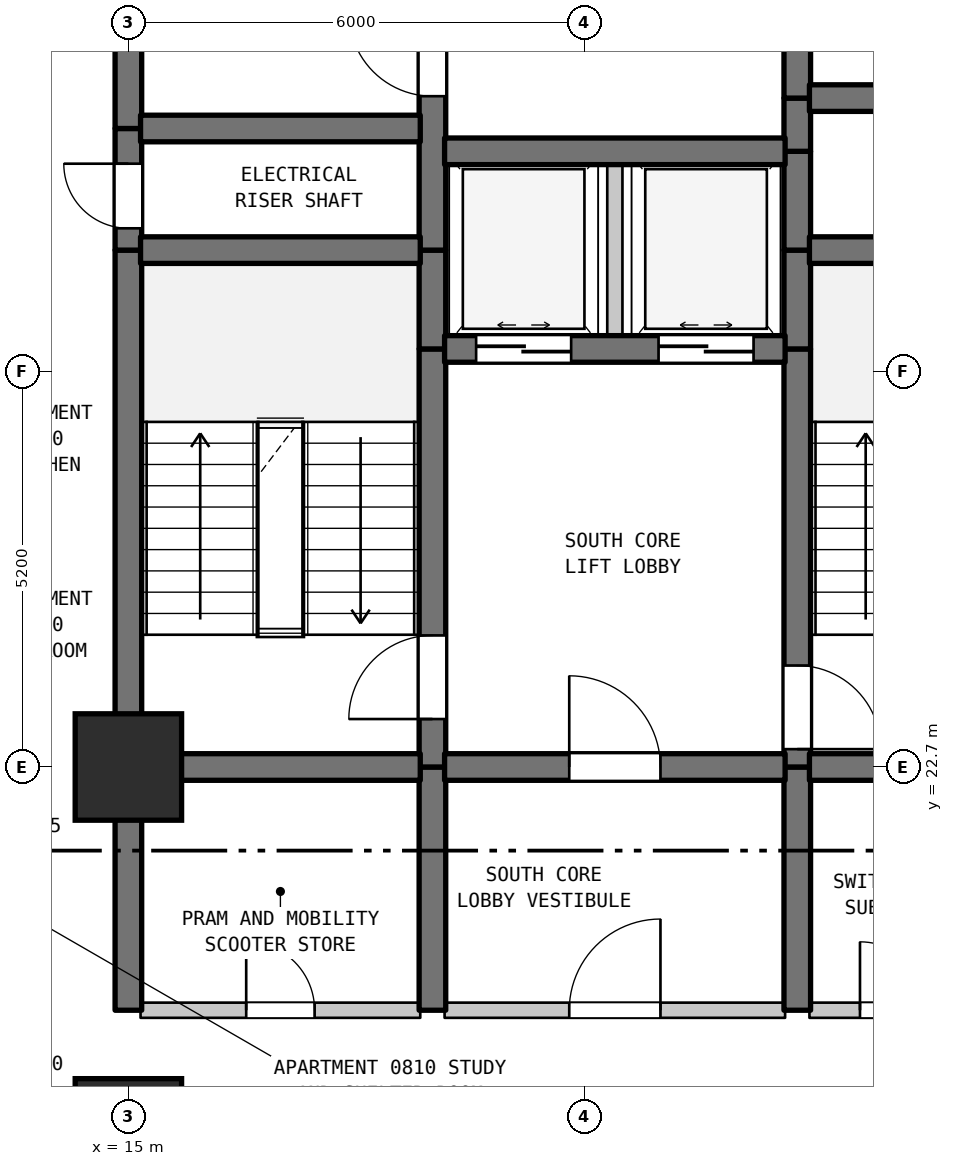
"""IFC4 building model, lengths in metres.
Left out: names, types, materials, properties, quantities, classifications, styles, units other than length and angle.
Written with IfcOpenShell. Run it as: python <this file> out.ifc"""

import sys

from ifc_helpers import new_model, si_unit, direction, frame, frame_2d, origin, origin_2d, place, context, subcontext, project, spatial, rectangle, extrude, element, fill, save


model = new_model("IFC4")
c1 = context("Model", 3, precision=1e-05, world=origin(), true_north=direction((0.0, 1.0)))
c2 = subcontext(c1, "Body", "Model", "MODEL_VIEW")
j1 = project(units=[si_unit("LENGTHUNIT", "METRE"), si_unit("PLANEANGLEUNIT", "RADIAN")], contexts=[c1])
p1 = place(None, origin())
s1 = spatial("IfcSite", under=j1, at=p1, CompositionType="ELEMENT")
p2 = place(p1, origin())
s2 = spatial("IfcBuilding", under=s1, at=p2, CompositionType="ELEMENT")
p3 = place(p2, frame((0.0, 0.0, 38.8)))
s3 = spatial("IfcBuildingStorey", under=s2, at=p3, CompositionType="ELEMENT", Elevation=38.8)
for number, where, z_axis, x_axis in (
    (1, (15.0, 17.9, 0.0), (0.0, 0.0, 1.0), (1.0, 0.0, 0.0)),
    (2, (15.0, 22.7, 0.0), (0.0, 0.0, 1.0), (1.0, 0.0, 0.0)),
):
    element("IfcColumn", number, at=place(p3, frame(where, z_axis=z_axis, x_axis=x_axis)), inside=s3, PredefinedType="COLUMN", context=c2, shape_type="SweptSolid", body=[
        extrude(rectangle(XDim=1.4, YDim=1.4, at=origin_2d()), origin(), (0.0, 0.0, 1.0), 3.7),
    ])
p4 = place(p3, frame((15.0, 19.5, 0.0), z_axis=(0.0, 0.0, 1.0), x_axis=(0.0, 1.0, 0.0)))
e3 = element("IfcWall", 3, at=p4, inside=s3, PredefinedType="SHEAR", context=c2, shape_type="SweptSolid", body=[
    extrude(rectangle(XDim=3.2, YDim=0.35, at=frame_2d((1.6, 0.0))), origin(), (0.0, 0.0, 1.0), 3.385),
])
p5 = place(p3, frame((15.0, 22.7, 0.0), z_axis=(0.0, 0.0, 1.0), x_axis=(0.0, 1.0, 0.0)))
e4 = element("IfcWall", 4, at=p5, inside=s3, PredefinedType="SHEAR", context=c2, shape_type="SweptSolid", body=[
    extrude(rectangle(XDim=6.8, YDim=0.35, at=frame_2d((3.4, 0.0))), origin(), (0.0, 0.0, 1.0), 3.385),
])
p6 = place(p3, frame((15.0, 29.5, 0.0), z_axis=(0.0, 0.0, 1.0), x_axis=(0.0, 1.0, 0.0)))
e5 = element("IfcWall", 5, at=p6, inside=s3, PredefinedType="SHEAR", context=c2, shape_type="SweptSolid", body=[
    extrude(rectangle(XDim=1.6, YDim=0.35, at=frame_2d((0.8, 0.0))), origin(), (0.0, 0.0, 1.0), 3.385),
])
p7 = place(p6, frame((0.287, 0.0, 0.0)))
e6 = element("IfcOpeningElement", 6, at=p7, cuts=e5, PredefinedType="OPENING", context=c2, shape_type="SweptSolid", body=[
    extrude(rectangle(XDim=0.85, YDim=2.1, at=frame_2d((0.425, 1.05))), frame((0.0, 0.185, 0.0), z_axis=(0.0, -1.0, 0.0), x_axis=(1.0, 0.0, 0.0)), (0.0, 0.0, 1.0), 0.37),
])
p8 = place(p3, frame((15.0, 31.1, 0.0), z_axis=(0.0, 0.0, 1.0), x_axis=(0.0, 1.0, 0.0)))
e7 = element("IfcWall", 7, at=p8, inside=s3, PredefinedType="SHEAR", context=c2, shape_type="SweptSolid", body=[
    extrude(rectangle(XDim=6.8, YDim=0.35, at=frame_2d((3.4, 0.0))), origin(), (0.0, 0.0, 1.0), 3.385),
])
p9 = place(p3, frame((19.0, 19.5, 0.0), z_axis=(0.0, 0.0, 1.0), x_axis=(0.0, 1.0, 0.0)))
e8 = element("IfcWall", 8, at=p9, inside=s3, PredefinedType="SHEAR", context=c2, shape_type="SweptSolid", body=[
    extrude(rectangle(XDim=3.2, YDim=0.35, at=frame_2d((1.6, 0.0))), origin(), (0.0, 0.0, 1.0), 3.385),
])
p10 = place(p3, frame((19.0, 22.7, 0.0), z_axis=(0.0, 0.0, 1.0), x_axis=(0.0, 1.0, 0.0)))
e9 = element("IfcWall", 9, at=p10, inside=s3, PredefinedType="SHEAR", context=c2, shape_type="SweptSolid", body=[
    extrude(rectangle(XDim=5.5, YDim=0.35, at=frame_2d((2.75, 0.0))), origin(), (0.0, 0.0, 1.0), 3.385),
])
p11 = place(p10, frame((0.631, 0.0, 0.0)))
e10 = element("IfcOpeningElement", 10, at=p11, cuts=e9, PredefinedType="OPENING", context=c2, shape_type="SweptSolid", body=[
    extrude(rectangle(XDim=1.1, YDim=2.15, at=frame_2d((0.55, 1.075))), frame((0.0, 0.185, 0.0), z_axis=(0.0, -1.0, 0.0), x_axis=(1.0, 0.0, 0.0)), (0.0, 0.0, 1.0), 0.37),
])
p12 = place(p3, frame((19.0, 28.2, 0.0), z_axis=(0.0, 0.0, 1.0), x_axis=(0.0, 1.0, 0.0)))
e11 = element("IfcWall", 11, at=p12, inside=s3, PredefinedType="SHEAR", context=c2, shape_type="SweptSolid", body=[
    extrude(rectangle(XDim=1.3, YDim=0.35, at=frame_2d((0.65, 0.0))), origin(), (0.0, 0.0, 1.0), 3.385),
])
p13 = place(p3, frame((19.0, 29.5, 0.0), z_axis=(0.0, 0.0, 1.0), x_axis=(0.0, 1.0, 0.0)))
e12 = element("IfcWall", 12, at=p13, inside=s3, PredefinedType="SHEAR", context=c2, shape_type="SweptSolid", body=[
    extrude(rectangle(XDim=5.5, YDim=0.35, at=frame_2d((2.75, 0.0))), origin(), (0.0, 0.0, 1.0), 3.385),
])
p14 = place(p13, frame((2.025, 0.0, 0.0)))
e13 = element("IfcOpeningElement", 13, at=p14, cuts=e12, PredefinedType="OPENING", context=c2, shape_type="SweptSolid", body=[
    extrude(rectangle(XDim=1.1, YDim=2.15, at=frame_2d((0.55, 1.075))), frame((0.0, 0.185, 0.0), z_axis=(0.0, -1.0, 0.0), x_axis=(1.0, 0.0, 0.0)), (0.0, 0.0, 1.0), 0.37),
])
p15 = place(p3, frame((21.4, 28.2, 0.0), z_axis=(0.0, 0.0, 1.0), x_axis=(0.0, 1.0, 0.0)))
e14 = element("IfcWall", 14, at=p15, inside=s3, PredefinedType="STANDARD", context=c2, shape_type="SweptSolid", body=[
    extrude(rectangle(XDim=2.6, YDim=0.2, at=frame_2d((1.3, 0.0))), origin(), (0.0, 0.0, 1.0), 3.385),
])
p16 = place(p3, frame((23.8, 19.5, 0.0), z_axis=(0.0, 0.0, 1.0), x_axis=(0.0, 1.0, 0.0)))
e15 = element("IfcWall", 15, at=p16, inside=s3, PredefinedType="SHEAR", context=c2, shape_type="SweptSolid", body=[
    extrude(rectangle(XDim=3.2, YDim=0.35, at=frame_2d((1.6, 0.0))), origin(), (0.0, 0.0, 1.0), 3.385),
])
p17 = place(p3, frame((23.8, 22.7, 0.0), z_axis=(0.0, 0.0, 1.0), x_axis=(0.0, 1.0, 0.0)))
e16 = element("IfcWall", 16, at=p17, inside=s3, PredefinedType="SHEAR", context=c2, shape_type="SweptSolid", body=[
    extrude(rectangle(XDim=5.5, YDim=0.35, at=frame_2d((2.75, 0.0))), origin(), (0.0, 0.0, 1.0), 3.385),
])
p18 = place(p17, frame((0.235, 0.0, 0.0)))
e17 = element("IfcOpeningElement", 17, at=p18, cuts=e16, PredefinedType="OPENING", context=c2, shape_type="SweptSolid", body=[
    extrude(rectangle(XDim=1.1, YDim=2.15, at=frame_2d((0.55, 1.075))), frame((0.0, 0.185, 0.0), z_axis=(0.0, -1.0, 0.0), x_axis=(1.0, 0.0, 0.0)), (0.0, 0.0, 1.0), 0.37),
])
for number, where, z_axis, x_axis in (
    (18, (23.8, 28.2, 0.0), (0.0, 0.0, 1.0), (0.0, 1.0, 0.0)),
    (19, (23.8, 29.5, 0.0), (0.0, 0.0, 1.0), (0.0, 1.0, 0.0)),
):
    element("IfcWall", number, at=place(p3, frame(where, z_axis=z_axis, x_axis=x_axis)), inside=s3, PredefinedType="SHEAR", context=c2, shape_type="SweptSolid", body=[
        extrude(rectangle(XDim=1.3, YDim=0.35, at=frame_2d((0.65, 0.0))), origin(), (0.0, 0.0, 1.0), 3.385),
    ])
p19 = place(p3, frame((23.8, 30.8, 0.0), z_axis=(0.0, 0.0, 1.0), x_axis=(0.0, 1.0, 0.0)))
e20 = element("IfcWall", 20, at=p19, inside=s3, PredefinedType="SHEAR", context=c2, shape_type="SweptSolid", body=[
    extrude(rectangle(XDim=0.7, YDim=0.35, at=frame_2d((0.35, 0.0))), origin(), (0.0, 0.0, 1.0), 3.385),
])
p20 = place(p3, frame((23.8, 31.5, 0.0), z_axis=(0.0, 0.0, 1.0), x_axis=(0.0, 1.0, 0.0)))
e21 = element("IfcWall", 21, at=p20, inside=s3, PredefinedType="SHEAR", context=c2, shape_type="SweptSolid", body=[
    extrude(rectangle(XDim=3.5, YDim=0.35, at=frame_2d((1.75, 0.0))), origin(), (0.0, 0.0, 1.0), 3.385),
])
p21 = place(p20, frame((1.127, 0.0, 0.0)))
e22 = element("IfcOpeningElement", 22, at=p21, cuts=e21, PredefinedType="OPENING", context=c2, shape_type="SweptSolid", body=[
    extrude(rectangle(XDim=1.1, YDim=2.15, at=frame_2d((0.55, 1.075))), frame((0.0, 0.185, 0.0), z_axis=(0.0, -1.0, 0.0), x_axis=(1.0, 0.0, 0.0)), (0.0, 0.0, 1.0), 0.37),
])
p22 = place(p3, frame((15.16, 19.5, 0.0), z_axis=(0.0, 0.0, 1.0), x_axis=(1.0, 0.0, 0.0)))
e23 = element("IfcWall", 23, at=p22, inside=s3, PredefinedType="STANDARD", context=c2, shape_type="SweptSolid", body=[
    extrude(rectangle(XDim=3.68, YDim=0.2, at=frame_2d((1.84, 0.0))), origin(), (0.0, 0.0, 1.0), 3.385),
])
p23 = place(p22, frame((1.39, 0.0, 0.0)))
e24 = element("IfcOpeningElement", 24, at=p23, cuts=e23, PredefinedType="OPENING", context=c2, shape_type="SweptSolid", body=[
    extrude(rectangle(XDim=0.9, YDim=2.15, at=frame_2d((0.45, 1.075))), frame((0.0, 0.11, 0.0), z_axis=(0.0, -1.0, 0.0), x_axis=(1.0, 0.0, 0.0)), (0.0, 0.0, 1.0), 0.22),
])
p24 = place(p3, frame((19.16, 19.5, 0.0), z_axis=(0.0, 0.0, 1.0), x_axis=(1.0, 0.0, 0.0)))
e25 = element("IfcWall", 25, at=p24, inside=s3, PredefinedType="STANDARD", context=c2, shape_type="SweptSolid", body=[
    extrude(rectangle(XDim=4.48, YDim=0.2, at=frame_2d((2.24, 0.0))), origin(), (0.0, 0.0, 1.0), 3.385),
])
p25 = place(p24, frame((1.64, 0.0, 0.0)))
e26 = element("IfcOpeningElement", 26, at=p25, cuts=e25, PredefinedType="OPENING", context=c2, shape_type="SweptSolid", body=[
    extrude(rectangle(XDim=1.2, YDim=2.2, at=frame_2d((0.6, 1.1))), frame((0.0, 0.11, 0.0), z_axis=(0.0, -1.0, 0.0), x_axis=(1.0, 0.0, 0.0)), (0.0, 0.0, 1.0), 0.22),
])
p26 = place(p3, frame((23.96, 19.5, 0.0), z_axis=(0.0, 0.0, 1.0), x_axis=(1.0, 0.0, 0.0)))
e27 = element("IfcWall", 27, at=p26, inside=s3, PredefinedType="STANDARD", context=c2, shape_type="SweptSolid", body=[
    extrude(rectangle(XDim=4.455, YDim=0.2, at=frame_2d((2.228, 0.0))), origin(), (0.0, 0.0, 1.0), 3.385),
])
p27 = place(p26, frame((0.665, 0.0, 0.0)))
e28 = element("IfcOpeningElement", 28, at=p27, cuts=e27, PredefinedType="OPENING", context=c2, shape_type="SweptSolid", body=[
    extrude(rectangle(XDim=0.9, YDim=2.15, at=frame_2d((0.45, 1.075))), frame((0.0, 0.11, 0.0), z_axis=(0.0, -1.0, 0.0), x_axis=(1.0, 0.0, 0.0)), (0.0, 0.0, 1.0), 0.22),
])
p28 = place(p26, frame((2.791, 0.0, 0.0)))
e29 = element("IfcOpeningElement", 29, at=p28, cuts=e27, PredefinedType="OPENING", context=c2, shape_type="SweptSolid", body=[
    extrude(rectangle(XDim=0.9, YDim=2.15, at=frame_2d((0.45, 1.075))), frame((0.0, 0.11, 0.0), z_axis=(0.0, -1.0, 0.0), x_axis=(1.0, 0.0, 0.0)), (0.0, 0.0, 1.0), 0.22),
])
p29 = place(p3, frame((15.16, 22.7, 0.0), z_axis=(0.0, 0.0, 1.0), x_axis=(1.0, 0.0, 0.0)))
e30 = element("IfcWall", 30, at=p29, inside=s3, PredefinedType="SHEAR", context=c2, shape_type="SweptSolid", body=[
    extrude(rectangle(XDim=3.68, YDim=0.35, at=frame_2d((1.84, 0.0))), origin(), (0.0, 0.0, 1.0), 3.385),
])
p30 = place(p3, frame((19.16, 22.7, 0.0), z_axis=(0.0, 0.0, 1.0), x_axis=(1.0, 0.0, 0.0)))
e31 = element("IfcWall", 31, at=p30, inside=s3, PredefinedType="SHEAR", context=c2, shape_type="SweptSolid", body=[
    extrude(rectangle(XDim=4.48, YDim=0.35, at=frame_2d((2.24, 0.0))), origin(), (0.0, 0.0, 1.0), 3.385),
])
p31 = place(p30, frame((1.64, 0.0, 0.0)))
e32 = element("IfcOpeningElement", 32, at=p31, cuts=e31, PredefinedType="OPENING", context=c2, shape_type="SweptSolid", body=[
    extrude(rectangle(XDim=1.2, YDim=2.2, at=frame_2d((0.6, 1.1))), frame((0.0, 0.185, 0.0), z_axis=(0.0, -1.0, 0.0), x_axis=(1.0, 0.0, 0.0)), (0.0, 0.0, 1.0), 0.37),
])
p32 = place(p3, frame((23.96, 22.7, 0.0), z_axis=(0.0, 0.0, 1.0), x_axis=(1.0, 0.0, 0.0)))
e33 = element("IfcWall", 33, at=p32, inside=s3, PredefinedType="SHEAR", context=c2, shape_type="SweptSolid", body=[
    extrude(rectangle(XDim=3.18, YDim=0.35, at=frame_2d((1.59, 0.0))), origin(), (0.0, 0.0, 1.0), 3.385),
])
p33 = place(p3, frame((19.16, 28.2, 0.0), z_axis=(0.0, 0.0, 1.0), x_axis=(1.0, 0.0, 0.0)))
e34 = element("IfcWall", 34, at=p33, inside=s3, PredefinedType="SHEAR", context=c2, shape_type="SweptSolid", body=[
    extrude(rectangle(XDim=4.48, YDim=0.35, at=frame_2d((2.24, 0.0))), origin(), (0.0, 0.0, 1.0), 3.385),
])
p34 = place(p33, frame((0.415, 0.0, 0.0)))
e35 = element("IfcOpeningElement", 35, at=p34, cuts=e34, PredefinedType="OPENING", context=c2, shape_type="SweptSolid", body=[
    extrude(rectangle(XDim=1.25, YDim=2.2, at=frame_2d((0.625, 1.1))), frame((0.0, 0.185, 0.0), z_axis=(0.0, -1.0, 0.0), x_axis=(1.0, 0.0, 0.0)), (0.0, 0.0, 1.0), 0.37),
])
p35 = place(p33, frame((2.815, 0.0, 0.0)))
e36 = element("IfcOpeningElement", 36, at=p35, cuts=e34, PredefinedType="OPENING", context=c2, shape_type="SweptSolid", body=[
    extrude(rectangle(XDim=1.25, YDim=2.2, at=frame_2d((0.625, 1.1))), frame((0.0, 0.185, 0.0), z_axis=(0.0, -1.0, 0.0), x_axis=(1.0, 0.0, 0.0)), (0.0, 0.0, 1.0), 0.37),
])
p36 = place(p3, frame((15.16, 29.5, 0.0), z_axis=(0.0, 0.0, 1.0), x_axis=(1.0, 0.0, 0.0)))
e37 = element("IfcWall", 37, at=p36, inside=s3, PredefinedType="SHEAR", context=c2, shape_type="SweptSolid", body=[
    extrude(rectangle(XDim=3.68, YDim=0.35, at=frame_2d((1.84, 0.0))), origin(), (0.0, 0.0, 1.0), 3.385),
])
p37 = place(p3, frame((23.96, 29.5, 0.0), z_axis=(0.0, 0.0, 1.0), x_axis=(1.0, 0.0, 0.0)))
e38 = element("IfcWall", 38, at=p37, inside=s3, PredefinedType="SHEAR", context=c2, shape_type="SweptSolid", body=[
    extrude(rectangle(XDim=3.18, YDim=0.35, at=frame_2d((1.59, 0.0))), origin(), (0.0, 0.0, 1.0), 3.385),
])
p38 = place(p3, frame((19.16, 30.8, 0.0), z_axis=(0.0, 0.0, 1.0), x_axis=(1.0, 0.0, 0.0)))
e39 = element("IfcWall", 39, at=p38, inside=s3, PredefinedType="SHEAR", context=c2, shape_type="SweptSolid", body=[
    extrude(rectangle(XDim=4.48, YDim=0.35, at=frame_2d((2.24, 0.0))), origin(), (0.0, 0.0, 1.0), 3.385),
])
p39 = place(p3, frame((15.16, 31.1, 0.0), z_axis=(0.0, 0.0, 1.0), x_axis=(1.0, 0.0, 0.0)))
e40 = element("IfcWall", 40, at=p39, inside=s3, PredefinedType="SHEAR", context=c2, shape_type="SweptSolid", body=[
    extrude(rectangle(XDim=3.68, YDim=0.35, at=frame_2d((1.84, 0.0))), origin(), (0.0, 0.0, 1.0), 3.385),
])
p40 = place(p3, frame((23.96, 31.5, 0.0), z_axis=(0.0, 0.0, 1.0), x_axis=(1.0, 0.0, 0.0)))
e41 = element("IfcWall", 41, at=p40, inside=s3, PredefinedType="SHEAR", context=c2, shape_type="SweptSolid", body=[
    extrude(rectangle(XDim=3.18, YDim=0.35, at=frame_2d((1.59, 0.0))), origin(), (0.0, 0.0, 1.0), 3.385),
])
p41 = place(p40, frame((1.094, 0.0, 0.0)))
e42 = element("IfcOpeningElement", 42, at=p41, cuts=e41, PredefinedType="OPENING", context=c2, shape_type="SweptSolid", body=[
    extrude(rectangle(XDim=0.85, YDim=2.1, at=frame_2d((0.425, 1.05))), frame((0.0, 0.185, 0.0), z_axis=(0.0, -1.0, 0.0), x_axis=(1.0, 0.0, 0.0)), (0.0, 0.0, 1.0), 0.37),
])
p42 = place(p7, origin())
e43 = element("IfcDoor", 43, at=p42, inside=s3, OperationType="SINGLE_SWING_RIGHT", PredefinedType="DOOR", context=c2, shape_type="SweptSolid", body=[
    extrude(rectangle(XDim=0.85, YDim=2.1, at=frame_2d((0.425, 1.05))), frame((0.0, 0.025, 0.0), z_axis=(0.0, -1.0, 0.0), x_axis=(1.0, 0.0, 0.0)), (0.0, 0.0, 1.0), 0.05),
])
fill(e6, e43)
p43 = place(p11, origin())
e44 = element("IfcDoor", 44, at=p43, inside=s3, OperationType="SINGLE_SWING_LEFT", PredefinedType="DOOR", context=c2, shape_type="SweptSolid", body=[
    extrude(rectangle(XDim=1.1, YDim=2.15, at=frame_2d((0.55, 1.075))), frame((0.0, 0.025, 0.0), z_axis=(0.0, -1.0, 0.0), x_axis=(1.0, 0.0, 0.0)), (0.0, 0.0, 1.0), 0.05),
])
fill(e10, e44)
p44 = place(p14, origin())
e45 = element("IfcDoor", 45, at=p44, inside=s3, OperationType="SINGLE_SWING_RIGHT", PredefinedType="DOOR", context=c2, shape_type="SweptSolid", body=[
    extrude(rectangle(XDim=1.1, YDim=2.15, at=frame_2d((0.55, 1.075))), frame((0.0, 0.025, 0.0), z_axis=(0.0, -1.0, 0.0), x_axis=(1.0, 0.0, 0.0)), (0.0, 0.0, 1.0), 0.05),
])
fill(e13, e45)
p45 = place(p18, frame((1.1, 0.0, 0.0), z_axis=(0.0, 0.0, 1.0), x_axis=(-1.0, 0.0, 0.0)))
e46 = element("IfcDoor", 46, at=p45, inside=s3, OperationType="SINGLE_SWING_LEFT", PredefinedType="DOOR", context=c2, shape_type="SweptSolid", body=[
    extrude(rectangle(XDim=1.1, YDim=2.15, at=frame_2d((0.55, 1.075))), frame((0.0, 0.025, 0.0), z_axis=(0.0, -1.0, 0.0), x_axis=(1.0, 0.0, 0.0)), (0.0, 0.0, 1.0), 0.05),
])
fill(e17, e46)
p46 = place(p23, origin())
e47 = element("IfcDoor", 47, at=p46, inside=s3, OperationType="SINGLE_SWING_LEFT", PredefinedType="DOOR", context=c2, shape_type="SweptSolid", body=[
    extrude(rectangle(XDim=0.9, YDim=2.15, at=frame_2d((0.45, 1.075))), frame((0.0, 0.025, 0.0), z_axis=(0.0, -1.0, 0.0), x_axis=(1.0, 0.0, 0.0)), (0.0, 0.0, 1.0), 0.05),
])
fill(e24, e47)
p47 = place(p25, origin())
e48 = element("IfcDoor", 48, at=p47, inside=s3, OperationType="SINGLE_SWING_RIGHT", PredefinedType="DOOR", context=c2, shape_type="SweptSolid", body=[
    extrude(rectangle(XDim=1.2, YDim=2.2, at=frame_2d((0.6, 1.1))), frame((0.0, 0.025, 0.0), z_axis=(0.0, -1.0, 0.0), x_axis=(1.0, 0.0, 0.0)), (0.0, 0.0, 1.0), 0.05),
])
fill(e26, e48)
p48 = place(p27, origin())
e49 = element("IfcDoor", 49, at=p48, inside=s3, OperationType="SINGLE_SWING_LEFT", PredefinedType="DOOR", context=c2, shape_type="SweptSolid", body=[
    extrude(rectangle(XDim=0.9, YDim=2.15, at=frame_2d((0.45, 1.075))), frame((0.0, 0.025, 0.0), z_axis=(0.0, -1.0, 0.0), x_axis=(1.0, 0.0, 0.0)), (0.0, 0.0, 1.0), 0.05),
])
fill(e28, e49)
p49 = place(p31, origin())
e50 = element("IfcDoor", 50, at=p49, inside=s3, OperationType="SINGLE_SWING_LEFT", PredefinedType="DOOR", context=c2, shape_type="SweptSolid", body=[
    extrude(rectangle(XDim=1.2, YDim=2.2, at=frame_2d((0.6, 1.1))), frame((0.0, 0.025, 0.0), z_axis=(0.0, -1.0, 0.0), x_axis=(1.0, 0.0, 0.0)), (0.0, 0.0, 1.0), 0.05),
])
fill(e32, e50)
p50 = place(p34, origin())
e51 = element("IfcDoor", 51, at=p50, inside=s3, OperationType="DOUBLE_DOOR_SLIDING", PredefinedType="DOOR", context=c2, shape_type="SweptSolid", body=[
    extrude(rectangle(XDim=1.25, YDim=2.2, at=frame_2d((0.625, 1.1))), frame((0.0, 0.025, 0.0), z_axis=(0.0, -1.0, 0.0), x_axis=(1.0, 0.0, 0.0)), (0.0, 0.0, 1.0), 0.05),
])
fill(e35, e51)
p51 = place(p35, origin())
e52 = element("IfcDoor", 52, at=p51, inside=s3, OperationType="DOUBLE_DOOR_SLIDING", PredefinedType="DOOR", context=c2, shape_type="SweptSolid", body=[
    extrude(rectangle(XDim=1.25, YDim=2.2, at=frame_2d((0.625, 1.1))), frame((0.0, 0.025, 0.0), z_axis=(0.0, -1.0, 0.0), x_axis=(1.0, 0.0, 0.0)), (0.0, 0.0, 1.0), 0.05),
])
fill(e36, e52)
save(model, sys.argv[1])
